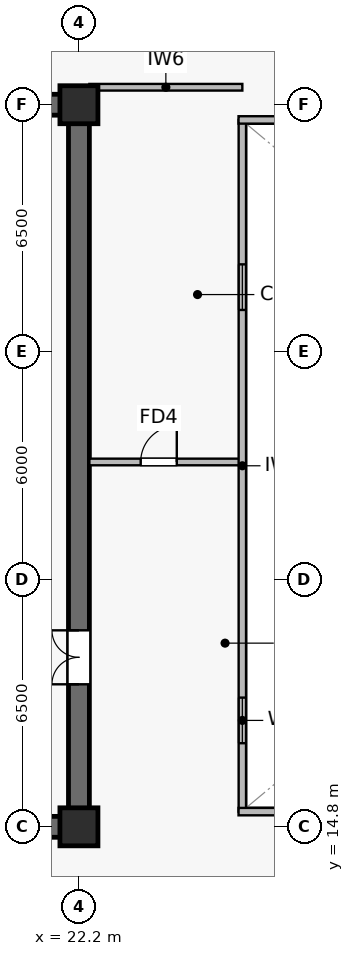
"""IFC4 building model, lengths in metres.
Left out: names, types, materials, properties, quantities, classifications, styles, units other than length and angle.
Written with IfcOpenShell. Run it as: python <this file> out.ifc"""

import sys

from ifc_helpers import new_model, si_unit, direction, frame, frame_2d, origin, origin_2d, place, context, subcontext, project, spatial, rectangle, extrude, source, transform, mapped, element, fill, save


model = new_model("IFC4")
c1 = context("Model", 3, precision=1e-05, world=origin(), true_north=direction((0.0, 1.0)))
c2 = subcontext(c1, "Body", "Model", "MODEL_VIEW")
j1 = project(units=[si_unit("LENGTHUNIT", "METRE"), si_unit("PLANEANGLEUNIT", "RADIAN")], contexts=[c1])
p1 = place(None, origin())
s1 = spatial("IfcSite", under=j1, at=p1, CompositionType="ELEMENT")
p2 = place(p1, origin())
s2 = spatial("IfcBuilding", under=s1, at=p2, CompositionType="ELEMENT")
p3 = place(p2, frame((0.0, 0.0, 279.3)))
s3 = spatial("IfcBuildingStorey", under=s2, at=p3, CompositionType="ELEMENT", Elevation=279.3)
p4 = place(p3, frame((7.125, 14.8, 0.0), z_axis=(0.0, 0.0, 1.0), x_axis=(1.0, 0.0, 0.0)))
e1 = element("IfcWall", 1, at=p4, inside=s3, PredefinedType="SHEAR", context=c2, shape_type="SweptSolid", body=[
    extrude(rectangle(XDim=15.35, YDim=0.55, at=frame_2d((7.675, 0.0))), origin(), (0.0, 0.0, 1.0), 3.8),
])
p5 = place(p3, frame((7.125, 33.8, 0.0), z_axis=(0.0, 0.0, 1.0), x_axis=(1.0, 0.0, 0.0)))
e2 = element("IfcWall", 2, at=p5, inside=s3, PredefinedType="SHEAR", context=c2, shape_type="SweptSolid", body=[
    extrude(rectangle(XDim=15.35, YDim=0.55, at=frame_2d((7.675, 0.0))), origin(), (0.0, 0.0, 1.0), 3.8),
])
p6 = place(p5, frame((8.325, 0.0, 0.0)))
e3 = element("IfcOpeningElement", 3, at=p6, cuts=e2, PredefinedType="OPENING", context=c2, shape_type="SweptSolid", body=[
    extrude(rectangle(XDim=0.95, YDim=2.15, at=frame_2d((0.475, 1.075))), frame((0.0, 0.285, 0.0), z_axis=(0.0, -1.0, 0.0), x_axis=(1.0, 0.0, 0.0)), (0.0, 0.0, 1.0), 0.57),
])
p7 = place(p5, frame((11.865, 0.0, 0.0)))
e4 = element("IfcOpeningElement", 4, at=p7, cuts=e2, PredefinedType="OPENING", context=c2, shape_type="SweptSolid", body=[
    extrude(rectangle(XDim=0.95, YDim=2.15, at=frame_2d((0.475, 1.075))), frame((0.0, 0.285, 0.0), z_axis=(0.0, -1.0, 0.0), x_axis=(1.0, 0.0, 0.0)), (0.0, 0.0, 1.0), 0.57),
])
p8 = place(p3, frame((22.2, 15.075, 0.0), z_axis=(0.0, 0.0, 1.0), x_axis=(0.0, 1.0, 0.0)))
e5 = element("IfcWall", 5, at=p8, inside=s3, PredefinedType="SHEAR", context=c2, shape_type="SweptSolid", body=[
    extrude(rectangle(XDim=18.45, YDim=0.55, at=frame_2d((9.225, 0.0))), origin(), (0.0, 0.0, 1.0), 3.8),
])
p9 = place(p8, frame((3.475, 0.0, 0.0)))
e6 = element("IfcOpeningElement", 6, at=p9, cuts=e5, PredefinedType="OPENING", context=c2, shape_type="SweptSolid", body=[
    extrude(rectangle(XDim=1.42, YDim=2.2, at=frame_2d((0.71, 1.1))), frame((0.0, 0.285, 0.0), z_axis=(0.0, -1.0, 0.0), x_axis=(1.0, 0.0, 0.0)), (0.0, 0.0, 1.0), 0.57),
])
m1 = source(origin(), c2, "Body", "SweptSolid", [
    extrude(rectangle(XDim=1.0, YDim=1.0, at=origin_2d()), origin(), (0.0, 0.0, 1.0), 4.1),
])
for number, where, z_axis, x_axis in (
    (7, (22.2, 14.8, 0.0), (0.0, 0.0, 1.0), (1.0, 0.0, 0.0)),
    (8, (22.2, 33.8, 0.0), (0.0, 0.0, 1.0), (1.0, 0.0, 0.0)),
):
    element("IfcColumn", number, at=place(p3, frame(where, z_axis=z_axis, x_axis=x_axis)), inside=s3, PredefinedType="COLUMN", context=c2, shape_type="MappedRepresentation", body=[
        mapped(m1, transform((0.0, 0.0, 0.0), scale=1.0)),
    ])
p10 = place(p3, frame((22.475, 34.26, 0.0), z_axis=(0.0, 0.0, 1.0), x_axis=(1.0, 0.0, 0.0)))
e9 = element("IfcWall", 9, at=p10, inside=s3, PredefinedType="PARTITIONING", context=c2, shape_type="SweptSolid", body=[
    extrude(rectangle(XDim=4.025, YDim=0.175, at=frame_2d((2.012, 0.0))), origin(), (0.0, 0.0, 1.0), 3.535),
])
p11 = place(p3, frame((22.475, 24.4, 0.0), z_axis=(0.0, 0.0, 1.0), x_axis=(1.0, 0.0, 0.0)))
e10 = element("IfcWall", 10, at=p11, inside=s3, PredefinedType="PARTITIONING", context=c2, shape_type="SweptSolid", body=[
    extrude(rectangle(XDim=4.025, YDim=0.175, at=frame_2d((2.012, 0.0))), origin(), (0.0, 0.0, 1.0), 3.8),
])
p12 = place(p11, frame((1.35, 0.0, 0.0)))
e11 = element("IfcOpeningElement", 11, at=p12, cuts=e10, PredefinedType="OPENING", context=c2, shape_type="SweptSolid", body=[
    extrude(rectangle(XDim=0.95, YDim=2.15, at=frame_2d((0.475, 1.075))), frame((0.0, 0.098, 0.0), z_axis=(0.0, -1.0, 0.0), x_axis=(1.0, 0.0, 0.0)), (0.0, 0.0, 1.0), 0.195),
])
p13 = place(p3, frame((26.5, 15.2, 0.0), z_axis=(0.0, 0.0, 1.0), x_axis=(0.0, 1.0, 0.0)))
e12 = element("IfcWall", 12, at=p13, inside=s3, PredefinedType="SOLIDWALL", context=c2, shape_type="SweptSolid", body=[
    extrude(rectangle(XDim=18.2, YDim=0.195, at=frame_2d((9.1, 0.0))), origin(), (0.0, 0.0, 1.0), 3.8),
])
p14 = place(p13, frame((1.8, 0.0, 0.9)))
e13 = element("IfcOpeningElement", 13, at=p14, cuts=e12, PredefinedType="OPENING", context=c2, shape_type="SweptSolid", body=[
    extrude(rectangle(XDim=1.2, YDim=1.35, at=frame_2d((0.6, 0.675))), frame((0.0, 0.107, 0.0), z_axis=(0.0, -1.0, 0.0), x_axis=(1.0, 0.0, 0.0)), (0.0, 0.0, 1.0), 0.215),
])
p15 = place(p13, frame((13.2, 0.0, 0.9)))
e14 = element("IfcOpeningElement", 14, at=p15, cuts=e12, PredefinedType="OPENING", context=c2, shape_type="SweptSolid", body=[
    extrude(rectangle(XDim=1.2, YDim=1.35, at=frame_2d((0.6, 0.675))), frame((0.0, 0.107, 0.0), z_axis=(0.0, -1.0, 0.0), x_axis=(1.0, 0.0, 0.0)), (0.0, 0.0, 1.0), 0.215),
])
for number, where, z_axis, x_axis in (
    (15, (26.4, 15.2, 0.0), (0.0, 0.0, 1.0), (1.0, 0.0, 0.0)),
    (16, (26.4, 33.4, 0.0), (0.0, 0.0, 1.0), (1.0, 0.0, 0.0)),
):
    element("IfcWall", number, at=place(p3, frame(where, z_axis=z_axis, x_axis=x_axis)), inside=s3, PredefinedType="SOLIDWALL", context=c2, shape_type="SweptSolid", body=[
        extrude(rectangle(XDim=22.0, YDim=0.195, at=frame_2d((11.0, 0.0))), origin(), (0.0, 0.0, 1.0), 3.8),
    ])
m2 = source(origin(), c2, "Body", "SweptSolid", [
    extrude(rectangle(XDim=1.2, YDim=1.35, at=frame_2d((0.6, 0.675))), frame((0.0, 0.03, 0.0), z_axis=(0.0, -1.0, 0.0), x_axis=(1.0, 0.0, 0.0)), (0.0, 0.0, 1.0), 0.06),
])
p16 = place(p14, origin())
e17 = element("IfcWindow", 17, at=p16, inside=s3, PartitioningType="SINGLE_PANEL", PredefinedType="WINDOW", context=c2, shape_type="MappedRepresentation", body=[
    mapped(m2, transform((0.0, 0.0, 0.0), scale=1.0)),
])
fill(e13, e17)
p17 = place(p15, origin())
e18 = element("IfcWindow", 18, at=p17, inside=s3, PartitioningType="SINGLE_PANEL", PredefinedType="WINDOW", context=c2, shape_type="MappedRepresentation", body=[
    mapped(m2, transform((0.0, 0.0, 0.0), scale=1.0)),
])
fill(e14, e18)
m3 = source(origin(), c2, "Body", "SweptSolid", [
    extrude(rectangle(XDim=1.42, YDim=2.2, at=frame_2d((0.71, 1.1))), frame((0.0, 0.025, 0.0), z_axis=(0.0, -1.0, 0.0), x_axis=(1.0, 0.0, 0.0)), (0.0, 0.0, 1.0), 0.05),
])
p18 = place(p9, origin())
e19 = element("IfcDoor", 19, at=p18, inside=s3, OperationType="DOUBLE_DOOR_SINGLE_SWING", PredefinedType="DOOR", context=c2, shape_type="MappedRepresentation", body=[
    mapped(m3, transform((0.0, 0.0, 0.0), scale=1.0)),
])
fill(e6, e19)
m4 = source(origin(), c2, "Body", "SweptSolid", [
    extrude(rectangle(XDim=0.95, YDim=2.15, at=frame_2d((0.475, 1.075))), frame((0.0, 0.025, 0.0), z_axis=(0.0, -1.0, 0.0), x_axis=(1.0, 0.0, 0.0)), (0.0, 0.0, 1.0), 0.05),
])
p19 = place(p12, origin())
e20 = element("IfcDoor", 20, at=p19, inside=s3, OperationType="SINGLE_SWING_RIGHT", PredefinedType="DOOR", context=c2, shape_type="MappedRepresentation", body=[
    mapped(m4, transform((0.0, 0.0, 0.0), scale=1.0)),
])
fill(e11, e20)
save(model, sys.argv[1])
